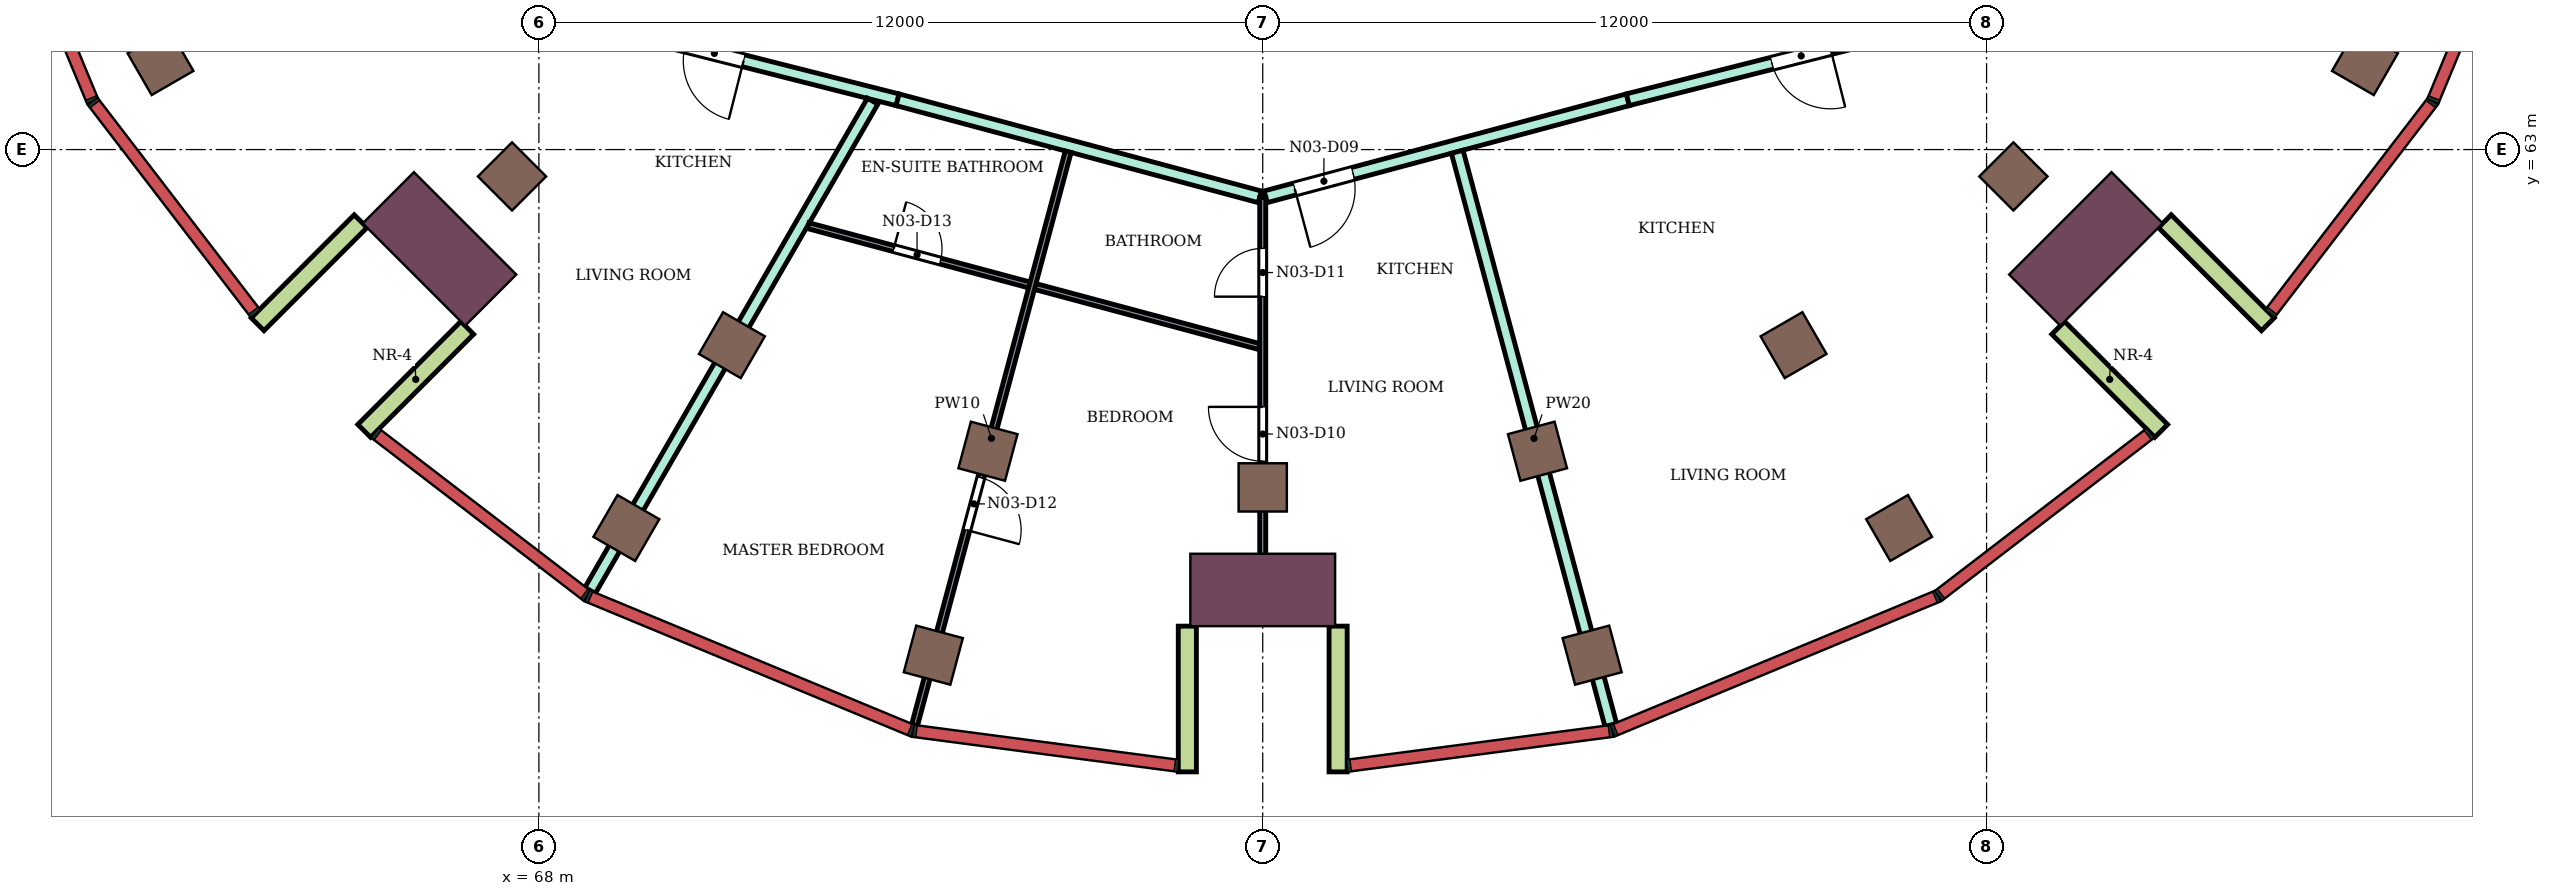
"""IFC4 building model, lengths in metres.
Left out: names, types, materials, properties, quantities, classifications, styles, units other than length and angle.
Written with IfcOpenShell. Run it as: python <this file> out.ifc"""

import sys

from ifc_helpers import new_model, si_unit, direction, frame, frame_2d, origin, origin_2d, place, context, subcontext, project, spatial, rectangle, extrude, element, fill, save


model = new_model("IFC4")
c1 = context("Model", 3, precision=1e-05, world=origin(), true_north=direction((0.0, 1.0)))
c2 = subcontext(c1, "Body", "Model", "MODEL_VIEW")
j1 = project(units=[si_unit("LENGTHUNIT", "METRE"), si_unit("PLANEANGLEUNIT", "RADIAN")], contexts=[c1])
p1 = place(None, origin())
s1 = spatial("IfcSite", under=j1, at=p1, CompositionType="ELEMENT")
p2 = place(p1, origin())
s2 = spatial("IfcBuilding", under=s1, at=p2, CompositionType="ELEMENT")
p3 = place(p2, frame((0.0, 0.0, 296.7)))
s3 = spatial("IfcBuildingStorey", under=s2, at=p3, CompositionType="ELEMENT", Elevation=296.7)
for number, where, z_axis, x_axis in (
    (1, (61.727, 64.45, 0.0), (0.0, 0.0, 1.0), (-0.866, -0.5, 0.0)),
    (2, (69.45, 56.727, 0.0), (0.0, 0.0, 1.0), (-0.5, -0.866, 0.0)),
    (3, (74.539, 54.619, 0.0), (0.0, 0.0, 1.0), (-0.259, -0.966, 0.0)),
    (4, (85.461, 54.619, 0.0), (0.0, 0.0, 1.0), (0.259, -0.966, 0.0)),
    (5, (90.55, 56.727, 0.0), (0.0, 0.0, 1.0), (0.5, -0.866, 0.0)),
    (6, (98.273, 64.45, 0.0), (0.0, 0.0, 1.0), (0.866, -0.5, 0.0)),
    (7, (67.555, 62.555, 0.0), (0.0, 0.0, 1.0), (-0.707, -0.707, 0.0)),
    (8, (71.2, 59.758, 0.0), (0.0, 0.0, 1.0), (-0.5, -0.866, 0.0)),
    (9, (75.445, 58.0, 0.0), (0.0, 0.0, 1.0), (-0.259, -0.966, 0.0)),
    (10, (80.0, 57.4, 0.0), (0.0, 0.0, 1.0), (0.0, -1.0, 0.0)),
    (11, (84.555, 58.0, 0.0), (0.0, 0.0, 1.0), (0.259, -0.966, 0.0)),
    (12, (88.8, 59.758, 0.0), (0.0, 0.0, 1.0), (0.5, -0.866, 0.0)),
    (13, (92.445, 62.555, 0.0), (0.0, 0.0, 1.0), (0.707, -0.707, 0.0)),
):
    element("IfcColumn", number, at=place(p3, frame(where, z_axis=z_axis, x_axis=x_axis)), inside=s3, PredefinedType="COLUMN", context=c2, shape_type="SweptSolid", body=[
        extrude(rectangle(XDim=0.8, YDim=0.8, at=origin_2d()), origin(), (0.0, 0.0, 1.0), 4.2),
    ])
for number, where, z_axis, x_axis in (
    (14, (66.353, 61.353, 0.0), (0.0, 0.0, 1.0), (-0.707, -0.707, 0.0)),
    (15, (80.0, 55.7, 0.0), (0.0, 0.0, 1.0), (0.0, -1.0, 0.0)),
    (16, (93.647, 61.353, 0.0), (0.0, 0.0, 1.0), (0.707, -0.707, 0.0)),
):
    element("IfcColumn", number, at=place(p3, frame(where, z_axis=z_axis, x_axis=x_axis)), inside=s3, PredefinedType="COLUMN", context=c2, shape_type="SweptSolid", body=[
        extrude(rectangle(XDim=1.2, YDim=2.4, at=origin_2d()), origin(), (0.0, 0.0, 1.0), 4.2),
    ])
for number, where, z_axis, x_axis in (
    (17, (65.045, 61.812, 0.0), (0.0, 0.0, 1.0), (-0.707, -0.707, 0.0)),
    (18, (66.812, 60.045, 0.0), (0.0, 0.0, 1.0), (-0.707, -0.707, 0.0)),
    (19, (78.75, 55.1, 0.0), (0.0, 0.0, 1.0), (0.0, -1.0, 0.0)),
    (20, (81.25, 55.1, 0.0), (0.0, 0.0, 1.0), (0.0, -1.0, 0.0)),
    (21, (93.188, 60.045, 0.0), (0.0, 0.0, 1.0), (0.707, -0.707, 0.0)),
    (22, (94.955, 61.812, 0.0), (0.0, 0.0, 1.0), (0.707, -0.707, 0.0)),
):
    element("IfcWall", number, at=place(p3, frame(where, z_axis=z_axis, x_axis=x_axis)), inside=s3, PredefinedType="NOTDEFINED", context=c2, shape_type="SweptSolid", body=[
        extrude(rectangle(XDim=2.416, YDim=0.3, at=frame_2d((1.208, 0.0))), origin(), (0.0, 0.0, 1.0), 4.2),
    ])
p4 = place(p3, frame((68.201, 65.28, 0.0), z_axis=(0.0, 0.0, 1.0), x_axis=(0.969421088032, -0.245403247897, 0.0)))
e23 = element("IfcWall", 23, at=p4, inside=s3, PredefinedType="PARTITIONING", context=c2, shape_type="SweptSolid", body=[
    extrude(rectangle(XDim=5.927, YDim=0.2, at=frame_2d((2.964, 0.0))), origin(), (0.0, 0.0, 1.0), 3.75),
])
p5 = place(p4, frame((2.293, 0.0, 0.0)))
e24 = element("IfcOpeningElement", 24, at=p5, cuts=e23, PredefinedType="OPENING", context=c2, shape_type="SweptSolid", body=[
    extrude(rectangle(XDim=1.0, YDim=2.1, at=frame_2d((0.5, 1.05))), frame((0.0, 0.11, 0.0), z_axis=(0.0, -1.0, 0.0), x_axis=(1.0, 0.0, 0.0)), (0.0, 0.0, 1.0), 0.22),
])
p6 = place(p3, frame((68.849, 55.692, 0.0), z_axis=(0.0, 0.0, 1.0), x_axis=(0.50011732958, 0.865957652922, 0.0)))
e25 = element("IfcWall", 25, at=p6, inside=s3, PredefinedType="PARTITIONING", context=c2, shape_type="SweptSolid", body=[
    extrude(rectangle(XDim=9.365, YDim=0.2, at=frame_2d((4.683, 0.0))), origin(), (0.0, 0.0, 1.0), 3.75),
])
p7 = place(p3, frame((73.947, 63.826, 0.0), z_axis=(0.0, 0.0, 1.0), x_axis=(0.965908253407, -0.258884619088, 0.0)))
e26 = element("IfcWall", 26, at=p7, inside=s3, PredefinedType="PARTITIONING", context=c2, shape_type="SweptSolid", body=[
    extrude(rectangle(XDim=6.217, YDim=0.2, at=frame_2d((3.108, 0.0))), origin(), (0.0, 0.0, 1.0), 3.75),
])
p8 = place(p3, frame((80.048, 62.217, 0.0), z_axis=(0.0, 0.0, 1.0), x_axis=(0.965937709386, 0.258774692708, 0.0)))
e27 = element("IfcWall", 27, at=p8, inside=s3, PredefinedType="PARTITIONING", context=c2, shape_type="SweptSolid", body=[
    extrude(rectangle(XDim=6.216, YDim=0.2, at=frame_2d((3.108, 0.0))), origin(), (0.0, 0.0, 1.0), 3.75),
])
p9 = place(p8, frame((0.5, 0.0, 0.0)))
e28 = element("IfcOpeningElement", 28, at=p9, cuts=e27, PredefinedType="OPENING", context=c2, shape_type="SweptSolid", body=[
    extrude(rectangle(XDim=1.0, YDim=2.1, at=frame_2d((0.5, 1.05))), frame((0.0, 0.11, 0.0), z_axis=(0.0, -1.0, 0.0), x_axis=(1.0, 0.0, 0.0)), (0.0, 0.0, 1.0), 0.22),
])
p10 = place(p3, frame((83.225, 62.963, 0.0), z_axis=(0.0, 0.0, 1.0), x_axis=(0.258782398991, -0.96593564484, 0.0)))
e29 = element("IfcWall", 29, at=p10, inside=s3, PredefinedType="PARTITIONING", context=c2, shape_type="SweptSolid", body=[
    extrude(rectangle(XDim=9.837, YDim=0.2, at=frame_2d((4.918, 0.0))), origin(), (0.0, 0.0, 1.0), 3.75),
])
p11 = place(p3, frame((86.053, 63.826, 0.0), z_axis=(0.0, 0.0, 1.0), x_axis=(0.969480070232, 0.245170131586, 0.0)))
e30 = element("IfcWall", 30, at=p11, inside=s3, PredefinedType="PARTITIONING", context=c2, shape_type="SweptSolid", body=[
    extrude(rectangle(XDim=5.907, YDim=0.2, at=frame_2d((2.954, 0.0))), origin(), (0.0, 0.0, 1.0), 3.75),
])
p12 = place(p11, frame((2.464, 0.0, 0.0)))
e31 = element("IfcOpeningElement", 31, at=p12, cuts=e30, PredefinedType="OPENING", context=c2, shape_type="SweptSolid", body=[
    extrude(rectangle(XDim=1.0, YDim=2.1, at=frame_2d((0.5, 1.05))), frame((0.0, 0.11, 0.0), z_axis=(0.0, -1.0, 0.0), x_axis=(1.0, 0.0, 0.0)), (0.0, 0.0, 1.0), 0.22),
])
p13 = place(p3, frame((72.465, 61.739, 0.0), z_axis=(0.0, 0.0, 1.0), x_axis=(0.965899611634, -0.258916859715, 0.0)))
e32 = element("IfcWall", 32, at=p13, inside=s3, PredefinedType="PARTITIONING", context=c2, shape_type="SweptSolid", body=[
    extrude(rectangle(XDim=7.74, YDim=0.1, at=frame_2d((3.87, 0.0))), origin(), (0.0, 0.0, 1.0), 3.75),
])
p14 = place(p13, frame((1.468, 0.0, 0.0)))
e33 = element("IfcOpeningElement", 33, at=p14, cuts=e32, PredefinedType="OPENING", context=c2, shape_type="SweptSolid", body=[
    extrude(rectangle(XDim=0.8, YDim=2.1, at=frame_2d((0.4, 1.05))), frame((0.0, 0.06, 0.0), z_axis=(0.0, -1.0, 0.0), x_axis=(1.0, 0.0, 0.0)), (0.0, 0.0, 1.0), 0.12),
])
p15 = place(p3, frame((74.229, 53.462, 0.0), z_axis=(0.0, 0.0, 1.0), x_axis=(0.258810097991, 0.965928223616, 0.0)))
e34 = element("IfcWall", 34, at=p15, inside=s3, PredefinedType="PARTITIONING", context=c2, shape_type="SweptSolid", body=[
    extrude(rectangle(XDim=9.838, YDim=0.1, at=frame_2d((4.919, 0.0))), origin(), (0.0, 0.0, 1.0), 3.75),
])
p16 = place(p15, frame((3.344, 0.0, 0.0)))
e35 = element("IfcOpeningElement", 35, at=p16, cuts=e34, PredefinedType="OPENING", context=c2, shape_type="SweptSolid", body=[
    extrude(rectangle(XDim=0.9, YDim=2.1, at=frame_2d((0.45, 1.05))), frame((0.0, 0.06, 0.0), z_axis=(0.0, -1.0, 0.0), x_axis=(1.0, 0.0, 0.0)), (0.0, 0.0, 1.0), 0.12),
])
p17 = place(p3, frame((80.0, 55.3, 0.0), z_axis=(0.0, 0.0, 1.0), x_axis=(0.0, 1.0, 0.0)))
e36 = element("IfcWall", 36, at=p17, inside=s3, PredefinedType="PARTITIONING", context=c2, shape_type="SweptSolid", body=[
    extrude(rectangle(XDim=6.904, YDim=0.1, at=frame_2d((3.452, 0.0))), origin(), (0.0, 0.0, 1.0), 3.75),
])
p18 = place(p17, frame((2.534, 0.0, 0.0)))
e37 = element("IfcOpeningElement", 37, at=p18, cuts=e36, PredefinedType="OPENING", context=c2, shape_type="SweptSolid", body=[
    extrude(rectangle(XDim=0.9, YDim=2.1, at=frame_2d((0.45, 1.05))), frame((0.0, 0.06, 0.0), z_axis=(0.0, -1.0, 0.0), x_axis=(1.0, 0.0, 0.0)), (0.0, 0.0, 1.0), 0.12),
])
p19 = place(p17, frame((5.261, 0.0, 0.0)))
e38 = element("IfcOpeningElement", 38, at=p19, cuts=e36, PredefinedType="OPENING", context=c2, shape_type="SweptSolid", body=[
    extrude(rectangle(XDim=0.8, YDim=2.1, at=frame_2d((0.4, 1.05))), frame((0.0, 0.06, 0.0), z_axis=(0.0, -1.0, 0.0), x_axis=(1.0, 0.0, 0.0)), (0.0, 0.0, 1.0), 0.12),
])
p20 = place(p12, frame((1.0, 0.0, 0.0), z_axis=(0.0, 0.0, 1.0), x_axis=(-1.0, 0.0, 0.0)))
e39 = element("IfcDoor", 39, at=p20, inside=s3, OperationType="SINGLE_SWING_LEFT", PredefinedType="DOOR", context=c2, shape_type="SweptSolid", body=[
    extrude(rectangle(XDim=1.0, YDim=2.1, at=frame_2d((0.5, 1.05))), frame((0.0, 0.025, 0.0), z_axis=(0.0, -1.0, 0.0), x_axis=(1.0, 0.0, 0.0)), (0.0, 0.0, 1.0), 0.05),
])
fill(e31, e39)
p21 = place(p9, frame((1.0, 0.0, 0.0), z_axis=(0.0, 0.0, 1.0), x_axis=(-1.0, 0.0, 0.0)))
e40 = element("IfcDoor", 40, at=p21, inside=s3, OperationType="SINGLE_SWING_RIGHT", PredefinedType="DOOR", context=c2, shape_type="SweptSolid", body=[
    extrude(rectangle(XDim=1.0, YDim=2.1, at=frame_2d((0.5, 1.05))), frame((0.0, 0.025, 0.0), z_axis=(0.0, -1.0, 0.0), x_axis=(1.0, 0.0, 0.0)), (0.0, 0.0, 1.0), 0.05),
])
fill(e28, e40)
p22 = place(p18, origin())
e41 = element("IfcDoor", 41, at=p22, inside=s3, OperationType="SINGLE_SWING_RIGHT", PredefinedType="DOOR", context=c2, shape_type="SweptSolid", body=[
    extrude(rectangle(XDim=0.9, YDim=2.1, at=frame_2d((0.45, 1.05))), frame((0.0, 0.025, 0.0), z_axis=(0.0, -1.0, 0.0), x_axis=(1.0, 0.0, 0.0)), (0.0, 0.0, 1.0), 0.05),
])
fill(e37, e41)
p23 = place(p19, origin())
e42 = element("IfcDoor", 42, at=p23, inside=s3, OperationType="SINGLE_SWING_LEFT", PredefinedType="DOOR", context=c2, shape_type="SweptSolid", body=[
    extrude(rectangle(XDim=0.8, YDim=2.1, at=frame_2d((0.4, 1.05))), frame((0.0, 0.025, 0.0), z_axis=(0.0, -1.0, 0.0), x_axis=(1.0, 0.0, 0.0)), (0.0, 0.0, 1.0), 0.05),
])
fill(e38, e42)
p24 = place(p16, frame((0.9, 0.0, 0.0), z_axis=(0.0, 0.0, 1.0), x_axis=(-1.0, 0.0, 0.0)))
e43 = element("IfcDoor", 43, at=p24, inside=s3, OperationType="SINGLE_SWING_RIGHT", PredefinedType="DOOR", context=c2, shape_type="SweptSolid", body=[
    extrude(rectangle(XDim=0.9, YDim=2.1, at=frame_2d((0.45, 1.05))), frame((0.0, 0.025, 0.0), z_axis=(0.0, -1.0, 0.0), x_axis=(1.0, 0.0, 0.0)), (0.0, 0.0, 1.0), 0.05),
])
fill(e35, e43)
p25 = place(p14, origin())
e44 = element("IfcDoor", 44, at=p25, inside=s3, OperationType="SINGLE_SWING_LEFT", PredefinedType="DOOR", context=c2, shape_type="SweptSolid", body=[
    extrude(rectangle(XDim=0.8, YDim=2.1, at=frame_2d((0.4, 1.05))), frame((0.0, 0.025, 0.0), z_axis=(0.0, -1.0, 0.0), x_axis=(1.0, 0.0, 0.0)), (0.0, 0.0, 1.0), 0.05),
])
fill(e33, e44)
p26 = place(p5, frame((1.0, 0.0, 0.0), z_axis=(0.0, 0.0, 1.0), x_axis=(-1.0, 0.0, 0.0)))
e45 = element("IfcDoor", 45, at=p26, inside=s3, OperationType="SINGLE_SWING_LEFT", PredefinedType="DOOR", context=c2, shape_type="SweptSolid", body=[
    extrude(rectangle(XDim=1.0, YDim=2.1, at=frame_2d((0.5, 1.05))), frame((0.0, 0.025, 0.0), z_axis=(0.0, -1.0, 0.0), x_axis=(1.0, 0.0, 0.0)), (0.0, 0.0, 1.0), 0.05),
])
fill(e24, e45)
save(model, sys.argv[1])
